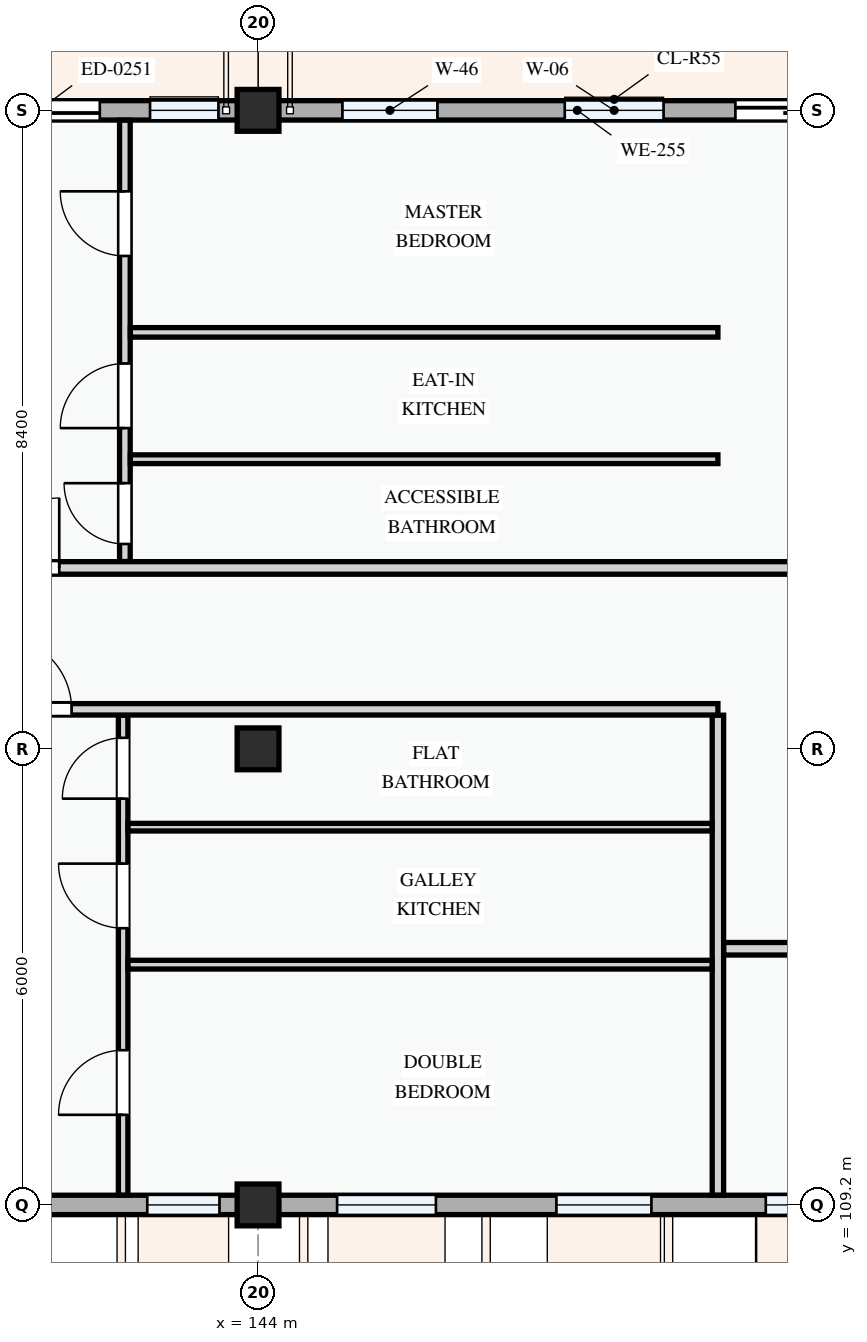
"""IFC4 building model, lengths in metres.
Left out: names, types, materials, properties, quantities, classifications, styles, units other than length and angle.
Written with IfcOpenShell. Run it as: python <this file> out.ifc"""

import sys

from ifc_helpers import new_model, si_unit, direction, frame, frame_2d, origin, origin_2d, place, context, subcontext, project, spatial, rectangle, extrude, element, fill, save


model = new_model("IFC4")
c1 = context("Model", 3, precision=1e-05, world=origin(), true_north=direction((0.0, 1.0)))
c2 = subcontext(c1, "Body", "Model", "MODEL_VIEW")
j1 = project(units=[si_unit("LENGTHUNIT", "METRE"), si_unit("PLANEANGLEUNIT", "RADIAN")], contexts=[c1])
p1 = place(None, origin())
s1 = spatial("IfcSite", under=j1, at=p1, CompositionType="ELEMENT")
p2 = place(p1, origin())
s2 = spatial("IfcBuilding", under=s1, at=p2, CompositionType="ELEMENT")
p3 = place(p2, frame((0.0, 0.0, 34.5)))
s3 = spatial("IfcBuildingStorey", under=s2, at=p3, CompositionType="ELEMENT", Elevation=34.5)
for number, where, z_axis, x_axis in (
    (1, (144.0, 109.2, 0.0), (0.0, 0.0, 1.0), (1.0, 0.0, 0.0)),
    (2, (144.0, 115.2, 0.0), (0.0, 0.0, 1.0), (1.0, 0.0, 0.0)),
    (3, (144.0, 123.6, 0.0), (0.0, 0.0, 1.0), (1.0, 0.0, 0.0)),
):
    element("IfcColumn", number, at=place(p3, frame(where, z_axis=z_axis, x_axis=x_axis)), inside=s3, PredefinedType="COLUMN", context=c2, shape_type="SweptSolid", body=[
        extrude(rectangle(XDim=0.55, YDim=0.55, at=origin_2d()), origin(), (0.0, 0.0, 1.0), 3.3),
    ])
p4 = place(p3, frame((152.4, 123.6, 0.0), z_axis=(0.0, 0.0, 1.0), x_axis=(-1.0, 0.0, 0.0)))
e4 = element("IfcWall", 4, at=p4, inside=s3, PredefinedType="STANDARD", context=c2, shape_type="SweptSolid", body=[
    extrude(rectangle(XDim=8.4, YDim=0.255, at=frame_2d((4.2, 0.0))), origin(), (0.0, 0.0, 1.0), 2.345),
])
p5 = place(p4, frame((0.62, 0.0, 0.0)))
e5 = element("IfcOpeningElement", 5, at=p5, cuts=e4, PredefinedType="OPENING", context=c2, shape_type="SweptSolid", body=[
    extrude(rectangle(XDim=1.5, YDim=2.2, at=frame_2d((0.75, 1.1))), frame((0.0, 0.137, 0.0), z_axis=(0.0, -1.0, 0.0), x_axis=(1.0, 0.0, 0.0)), (0.0, 0.0, 1.0), 0.275),
])
p6 = place(p4, frame((3.065, 0.0, 0.78)))
e6 = element("IfcOpeningElement", 6, at=p6, cuts=e4, PredefinedType="OPENING", context=c2, shape_type="SweptSolid", body=[
    extrude(rectangle(XDim=1.3, YDim=1.4, at=frame_2d((0.65, 0.7))), frame((0.0, 0.137, 0.0), z_axis=(0.0, -1.0, 0.0), x_axis=(1.0, 0.0, 0.0)), (0.0, 0.0, 1.0), 0.275),
])
p7 = place(p4, frame((6.04, 0.0, 0.78)))
e7 = element("IfcOpeningElement", 7, at=p7, cuts=e4, PredefinedType="OPENING", context=c2, shape_type="SweptSolid", body=[
    extrude(rectangle(XDim=1.25, YDim=1.3, at=frame_2d((0.625, 0.65))), frame((0.0, 0.137, 0.0), z_axis=(0.0, -1.0, 0.0), x_axis=(1.0, 0.0, 0.0)), (0.0, 0.0, 1.0), 0.275),
])
p8 = place(p3, frame((144.0, 123.6, 0.0), z_axis=(0.0, 0.0, 1.0), x_axis=(-1.0, 0.0, 0.0)))
e8 = element("IfcWall", 8, at=p8, inside=s3, PredefinedType="STANDARD", context=c2, shape_type="SweptSolid", body=[
    extrude(rectangle(XDim=6.0, YDim=0.255, at=frame_2d((3.0, 0.0))), origin(), (0.0, 0.0, 1.0), 2.445),
])
p9 = place(p8, frame((2.082, 0.0, 0.0)))
e9 = element("IfcOpeningElement", 9, at=p9, cuts=e8, PredefinedType="OPENING", context=c2, shape_type="SweptSolid", body=[
    extrude(rectangle(XDim=1.6, YDim=2.2, at=frame_2d((0.8, 1.1))), frame((0.0, 0.137, 0.0), z_axis=(0.0, -1.0, 0.0), x_axis=(1.0, 0.0, 0.0)), (0.0, 0.0, 1.0), 0.275),
])
p10 = place(p8, frame((0.521, 0.0, 0.78)))
e10 = element("IfcOpeningElement", 10, at=p10, cuts=e8, PredefinedType="OPENING", context=c2, shape_type="SweptSolid", body=[
    extrude(rectangle(XDim=0.9, YDim=1.2, at=frame_2d((0.45, 0.6))), frame((0.0, 0.137, 0.0), z_axis=(0.0, -1.0, 0.0), x_axis=(1.0, 0.0, 0.0)), (0.0, 0.0, 1.0), 0.275),
])
p11 = place(p8, frame((4.031, 0.0, 0.78)))
e11 = element("IfcOpeningElement", 11, at=p11, cuts=e8, PredefinedType="OPENING", context=c2, shape_type="SweptSolid", body=[
    extrude(rectangle(XDim=1.48, YDim=1.52, at=frame_2d((0.74, 0.76))), frame((0.0, 0.137, 0.0), z_axis=(0.0, -1.0, 0.0), x_axis=(1.0, 0.0, 0.0)), (0.0, 0.0, 1.0), 0.275),
])
p12 = place(p3, frame((138.0, 109.2, 0.0), z_axis=(0.0, 0.0, 1.0), x_axis=(1.0, 0.0, 0.0)))
e12 = element("IfcWall", 12, at=p12, inside=s3, PredefinedType="STANDARD", context=c2, shape_type="SweptSolid", body=[
    extrude(rectangle(XDim=6.0, YDim=0.255, at=frame_2d((3.0, 0.0))), origin(), (0.0, 0.0, 1.0), 2.525),
])
p13 = place(p12, frame((1.518, 0.0, 0.78)))
e13 = element("IfcOpeningElement", 13, at=p13, cuts=e12, PredefinedType="OPENING", context=c2, shape_type="SweptSolid", body=[
    extrude(rectangle(XDim=1.38, YDim=1.48, at=frame_2d((0.69, 0.74))), frame((0.0, 0.137, 0.0), z_axis=(0.0, -1.0, 0.0), x_axis=(1.0, 0.0, 0.0)), (0.0, 0.0, 1.0), 0.275),
])
p14 = place(p12, frame((4.542, 0.0, 0.78)))
e14 = element("IfcOpeningElement", 14, at=p14, cuts=e12, PredefinedType="OPENING", context=c2, shape_type="SweptSolid", body=[
    extrude(rectangle(XDim=0.95, YDim=1.15, at=frame_2d((0.475, 0.575))), frame((0.0, 0.137, 0.0), z_axis=(0.0, -1.0, 0.0), x_axis=(1.0, 0.0, 0.0)), (0.0, 0.0, 1.0), 0.275),
])
p15 = place(p3, frame((144.0, 109.2, 0.0), z_axis=(0.0, 0.0, 1.0), x_axis=(1.0, 0.0, 0.0)))
e15 = element("IfcWall", 15, at=p15, inside=s3, PredefinedType="STANDARD", context=c2, shape_type="SweptSolid", body=[
    extrude(rectangle(XDim=8.4, YDim=0.255, at=frame_2d((4.2, 0.0))), origin(), (0.0, 0.0, 1.0), 2.375),
])
p16 = place(p15, frame((1.04, 0.0, 0.78)))
e16 = element("IfcOpeningElement", 16, at=p16, cuts=e15, PredefinedType="OPENING", context=c2, shape_type="SweptSolid", body=[
    extrude(rectangle(XDim=1.3, YDim=1.4, at=frame_2d((0.65, 0.7))), frame((0.0, 0.137, 0.0), z_axis=(0.0, -1.0, 0.0), x_axis=(1.0, 0.0, 0.0)), (0.0, 0.0, 1.0), 0.275),
])
p17 = place(p15, frame((3.925, 0.0, 0.78)))
e17 = element("IfcOpeningElement", 17, at=p17, cuts=e15, PredefinedType="OPENING", context=c2, shape_type="SweptSolid", body=[
    extrude(rectangle(XDim=1.25, YDim=1.3, at=frame_2d((0.625, 0.65))), frame((0.0, 0.137, 0.0), z_axis=(0.0, -1.0, 0.0), x_axis=(1.0, 0.0, 0.0)), (0.0, 0.0, 1.0), 0.275),
])
p18 = place(p15, frame((6.68, 0.0, 0.78)))
e18 = element("IfcOpeningElement", 18, at=p18, cuts=e15, PredefinedType="OPENING", context=c2, shape_type="SweptSolid", body=[
    extrude(rectangle(XDim=0.9, YDim=1.2, at=frame_2d((0.45, 0.6))), frame((0.0, 0.137, 0.0), z_axis=(0.0, -1.0, 0.0), x_axis=(1.0, 0.0, 0.0)), (0.0, 0.0, 1.0), 0.275),
])
p19 = place(p3, frame((150.05, 109.33, 0.0), z_axis=(0.0, 0.0, 1.0), x_axis=(0.0, 1.0, 0.0)))
e19 = element("IfcWall", 19, at=p19, inside=s3, PredefinedType="PARTITIONING", context=c2, shape_type="SweptSolid", body=[
    extrude(rectangle(XDim=6.313, YDim=0.15, at=frame_2d((3.157, 0.0))), origin(), (0.0, 0.0, 1.0), 3.0),
])
p20 = place(p3, frame((150.127, 112.57, 0.0), z_axis=(0.0, 0.0, 1.0), x_axis=(1.0, 0.0, 0.0)))
e20 = element("IfcWall", 20, at=p20, inside=s3, PredefinedType="PARTITIONING", context=c2, shape_type="SweptSolid", body=[
    extrude(rectangle(XDim=2.413, YDim=0.165, at=frame_2d((1.207, 0.0))), origin(), (0.0, 0.0, 1.0), 3.0),
])
p21 = place(p3, frame((142.225, 109.33, 0.0), z_axis=(0.0, 0.0, 1.0), x_axis=(0.0, 1.0, 0.0)))
e21 = element("IfcWall", 21, at=p21, inside=s3, PredefinedType="PARTITIONING", context=c2, shape_type="SweptSolid", body=[
    extrude(rectangle(XDim=6.313, YDim=0.125, at=frame_2d((3.157, 0.0))), origin(), (0.0, 0.0, 1.0), 3.0),
])
p22 = place(p21, frame((1.056, 0.0, 0.0)))
e22 = element("IfcOpeningElement", 22, at=p22, cuts=e21, PredefinedType="OPENING", context=c2, shape_type="SweptSolid", body=[
    extrude(rectangle(XDim=0.85, YDim=2.1, at=frame_2d((0.425, 1.05))), frame((0.0, 0.073, 0.0), z_axis=(0.0, -1.0, 0.0), x_axis=(1.0, 0.0, 0.0)), (0.0, 0.0, 1.0), 0.145),
])
p23 = place(p21, frame((3.511, 0.0, 0.0)))
e23 = element("IfcOpeningElement", 23, at=p23, cuts=e21, PredefinedType="OPENING", context=c2, shape_type="SweptSolid", body=[
    extrude(rectangle(XDim=0.85, YDim=2.1, at=frame_2d((0.425, 1.05))), frame((0.0, 0.073, 0.0), z_axis=(0.0, -1.0, 0.0), x_axis=(1.0, 0.0, 0.0)), (0.0, 0.0, 1.0), 0.145),
])
p24 = place(p21, frame((5.215, 0.0, 0.0)))
e24 = element("IfcOpeningElement", 24, at=p24, cuts=e21, PredefinedType="OPENING", context=c2, shape_type="SweptSolid", body=[
    extrude(rectangle(XDim=0.8, YDim=2.1, at=frame_2d((0.4, 1.05))), frame((0.0, 0.073, 0.0), z_axis=(0.0, -1.0, 0.0), x_axis=(1.0, 0.0, 0.0)), (0.0, 0.0, 1.0), 0.145),
])
p25 = place(p3, frame((142.29, 112.361, 0.0), z_axis=(0.0, 0.0, 1.0), x_axis=(1.0, 0.0, 0.0)))
e25 = element("IfcWall", 25, at=p25, inside=s3, PredefinedType="PARTITIONING", context=c2, shape_type="SweptSolid", body=[
    extrude(rectangle(XDim=7.683, YDim=0.115, at=frame_2d((3.842, 0.0))), origin(), (0.0, 0.0, 1.0), 3.0),
])
p26 = place(p3, frame((142.29, 114.17, 0.0), z_axis=(0.0, 0.0, 1.0), x_axis=(1.0, 0.0, 0.0)))
e26 = element("IfcWall", 26, at=p26, inside=s3, PredefinedType="PARTITIONING", context=c2, shape_type="SweptSolid", body=[
    extrude(rectangle(XDim=7.683, YDim=0.1, at=frame_2d((3.842, 0.0))), origin(), (0.0, 0.0, 1.0), 3.0),
])
p27 = place(p3, frame((142.248, 117.665, 0.0), z_axis=(0.0, 0.0, 1.0), x_axis=(0.0, 1.0, 0.0)))
e27 = element("IfcWall", 27, at=p27, inside=s3, PredefinedType="PARTITIONING", context=c2, shape_type="SweptSolid", body=[
    extrude(rectangle(XDim=5.806, YDim=0.14, at=frame_2d((2.903, 0.0))), origin(), (0.0, 0.0, 1.0), 3.0),
])
p28 = place(p27, frame((0.231, 0.0, 0.0)))
e28 = element("IfcOpeningElement", 28, at=p28, cuts=e27, PredefinedType="OPENING", context=c2, shape_type="SweptSolid", body=[
    extrude(rectangle(XDim=0.8, YDim=2.1, at=frame_2d((0.4, 1.05))), frame((0.0, 0.08, 0.0), z_axis=(0.0, -1.0, 0.0), x_axis=(1.0, 0.0, 0.0)), (0.0, 0.0, 1.0), 0.16),
])
p29 = place(p27, frame((1.755, 0.0, 0.0)))
e29 = element("IfcOpeningElement", 29, at=p29, cuts=e27, PredefinedType="OPENING", context=c2, shape_type="SweptSolid", body=[
    extrude(rectangle(XDim=0.85, YDim=2.1, at=frame_2d((0.425, 1.05))), frame((0.0, 0.08, 0.0), z_axis=(0.0, -1.0, 0.0), x_axis=(1.0, 0.0, 0.0)), (0.0, 0.0, 1.0), 0.16),
])
p30 = place(p27, frame((4.02, 0.0, 0.0)))
e30 = element("IfcOpeningElement", 30, at=p30, cuts=e27, PredefinedType="OPENING", context=c2, shape_type="SweptSolid", body=[
    extrude(rectangle(XDim=0.85, YDim=2.1, at=frame_2d((0.425, 1.05))), frame((0.0, 0.08, 0.0), z_axis=(0.0, -1.0, 0.0), x_axis=(1.0, 0.0, 0.0)), (0.0, 0.0, 1.0), 0.16),
])
p31 = place(p3, frame((142.32, 120.679, 0.0), z_axis=(0.0, 0.0, 1.0), x_axis=(1.0, 0.0, 0.0)))
e31 = element("IfcWall", 31, at=p31, inside=s3, PredefinedType="PARTITIONING", context=c2, shape_type="SweptSolid", body=[
    extrude(rectangle(XDim=7.73, YDim=0.125, at=frame_2d((3.865, 0.0))), origin(), (0.0, 0.0, 1.0), 3.0),
])
p32 = place(p3, frame((142.32, 119.01, 0.0), z_axis=(0.0, 0.0, 1.0), x_axis=(1.0, 0.0, 0.0)))
e32 = element("IfcWall", 32, at=p32, inside=s3, PredefinedType="PARTITIONING", context=c2, shape_type="SweptSolid", body=[
    extrude(rectangle(XDim=7.73, YDim=0.115, at=frame_2d((3.865, 0.0))), origin(), (0.0, 0.0, 1.0), 3.0),
])
p33 = place(p3, frame((109.33, 115.72, 0.0), z_axis=(0.0, 0.0, 1.0), x_axis=(1.0, 0.0, 0.0)))
e33 = element("IfcWall", 33, at=p33, inside=s3, PredefinedType="PARTITIONING", context=c2, shape_type="SweptSolid", body=[
    extrude(rectangle(XDim=40.72, YDim=0.15, at=frame_2d((20.36, 0.0))), origin(), (0.0, 0.0, 1.0), 3.0),
])
p34 = place(p33, frame((2.32, 0.0, 0.0)))
e34 = element("IfcOpeningElement", 34, at=p34, cuts=e33, PredefinedType="OPENING", context=c2, shape_type="SweptSolid", body=[
    extrude(rectangle(XDim=0.92, YDim=2.1, at=frame_2d((0.46, 1.05))), frame((0.0, 0.085, 0.0), z_axis=(0.0, -1.0, 0.0), x_axis=(1.0, 0.0, 0.0)), (0.0, 0.0, 1.0), 0.17),
])
p35 = place(p33, frame((16.851, 0.0, 0.0)))
e35 = element("IfcOpeningElement", 35, at=p35, cuts=e33, PredefinedType="OPENING", context=c2, shape_type="SweptSolid", body=[
    extrude(rectangle(XDim=0.92, YDim=2.1, at=frame_2d((0.46, 1.05))), frame((0.0, 0.085, 0.0), z_axis=(0.0, -1.0, 0.0), x_axis=(1.0, 0.0, 0.0)), (0.0, 0.0, 1.0), 0.17),
])
p36 = place(p33, frame((31.258, 0.0, 0.0)))
e36 = element("IfcOpeningElement", 36, at=p36, cuts=e33, PredefinedType="OPENING", context=c2, shape_type="SweptSolid", body=[
    extrude(rectangle(XDim=0.96, YDim=2.12, at=frame_2d((0.48, 1.06))), frame((0.0, 0.085, 0.0), z_axis=(0.0, -1.0, 0.0), x_axis=(1.0, 0.0, 0.0)), (0.0, 0.0, 1.0), 0.17),
])
p37 = place(p3, frame((109.33, 117.58, 0.0), z_axis=(0.0, 0.0, 1.0), x_axis=(1.0, 0.0, 0.0)))
e37 = element("IfcWall", 37, at=p37, inside=s3, PredefinedType="PARTITIONING", context=c2, shape_type="SweptSolid", body=[
    extrude(rectangle(XDim=43.21, YDim=0.165, at=frame_2d((21.605, 0.0))), origin(), (0.0, 0.0, 1.0), 3.0),
])
p38 = place(p37, frame((2.337, 0.0, 0.0)))
e38 = element("IfcOpeningElement", 38, at=p38, cuts=e37, PredefinedType="OPENING", context=c2, shape_type="SweptSolid", body=[
    extrude(rectangle(XDim=0.92, YDim=2.1, at=frame_2d((0.46, 1.05))), frame((0.0, 0.093, 0.0), z_axis=(0.0, -1.0, 0.0), x_axis=(1.0, 0.0, 0.0)), (0.0, 0.0, 1.0), 0.185),
])
p39 = place(p37, frame((16.721, 0.0, 0.0)))
e39 = element("IfcOpeningElement", 39, at=p39, cuts=e37, PredefinedType="OPENING", context=c2, shape_type="SweptSolid", body=[
    extrude(rectangle(XDim=0.92, YDim=2.1, at=frame_2d((0.46, 1.05))), frame((0.0, 0.093, 0.0), z_axis=(0.0, -1.0, 0.0), x_axis=(1.0, 0.0, 0.0)), (0.0, 0.0, 1.0), 0.185),
])
p40 = place(p37, frame((31.135, 0.0, 0.0)))
e40 = element("IfcOpeningElement", 40, at=p40, cuts=e37, PredefinedType="OPENING", context=c2, shape_type="SweptSolid", body=[
    extrude(rectangle(XDim=0.92, YDim=2.1, at=frame_2d((0.46, 1.05))), frame((0.0, 0.093, 0.0), z_axis=(0.0, -1.0, 0.0), x_axis=(1.0, 0.0, 0.0)), (0.0, 0.0, 1.0), 0.185),
])
p41 = place(p5, frame((1.5, 0.0, 0.0), z_axis=(0.0, 0.0, 1.0), x_axis=(-1.0, 0.0, 0.0)))
e41 = element("IfcDoor", 41, at=p41, inside=s3, OperationType="SLIDING_TO_RIGHT", PredefinedType="DOOR", context=c2, shape_type="SweptSolid", body=[
    extrude(rectangle(XDim=1.5, YDim=2.2, at=frame_2d((0.75, 1.1))), frame((0.0, 0.025, 0.0), z_axis=(0.0, -1.0, 0.0), x_axis=(1.0, 0.0, 0.0)), (0.0, 0.0, 1.0), 0.05),
])
fill(e5, e41)
p42 = place(p6, origin())
e42 = element("IfcWindow", 42, at=p42, inside=s3, PartitioningType="SINGLE_PANEL", PredefinedType="WINDOW", context=c2, shape_type="SweptSolid", body=[
    extrude(rectangle(XDim=1.3, YDim=1.4, at=frame_2d((0.65, 0.7))), frame((0.0, 0.03, 0.0), z_axis=(0.0, -1.0, 0.0), x_axis=(1.0, 0.0, 0.0)), (0.0, 0.0, 1.0), 0.06),
])
fill(e6, e42)
p43 = place(p7, origin())
e43 = element("IfcWindow", 43, at=p43, inside=s3, PartitioningType="SINGLE_PANEL", PredefinedType="WINDOW", context=c2, shape_type="SweptSolid", body=[
    extrude(rectangle(XDim=1.25, YDim=1.3, at=frame_2d((0.625, 0.65))), frame((0.0, 0.03, 0.0), z_axis=(0.0, -1.0, 0.0), x_axis=(1.0, 0.0, 0.0)), (0.0, 0.0, 1.0), 0.06),
])
fill(e7, e43)
p44 = place(p9, frame((1.6, 0.0, 0.0), z_axis=(0.0, 0.0, 1.0), x_axis=(-1.0, 0.0, 0.0)))
e44 = element("IfcDoor", 44, at=p44, inside=s3, OperationType="SLIDING_TO_LEFT", PredefinedType="DOOR", context=c2, shape_type="SweptSolid", body=[
    extrude(rectangle(XDim=1.6, YDim=2.2, at=frame_2d((0.8, 1.1))), frame((0.0, 0.025, 0.0), z_axis=(0.0, -1.0, 0.0), x_axis=(1.0, 0.0, 0.0)), (0.0, 0.0, 1.0), 0.05),
])
fill(e9, e44)
p45 = place(p10, origin())
e45 = element("IfcWindow", 45, at=p45, inside=s3, PartitioningType="SINGLE_PANEL", PredefinedType="WINDOW", context=c2, shape_type="SweptSolid", body=[
    extrude(rectangle(XDim=0.9, YDim=1.2, at=frame_2d((0.45, 0.6))), frame((0.0, 0.03, 0.0), z_axis=(0.0, -1.0, 0.0), x_axis=(1.0, 0.0, 0.0)), (0.0, 0.0, 1.0), 0.06),
])
fill(e10, e45)
p46 = place(p14, origin())
e46 = element("IfcWindow", 46, at=p46, inside=s3, PartitioningType="SINGLE_PANEL", PredefinedType="WINDOW", context=c2, shape_type="SweptSolid", body=[
    extrude(rectangle(XDim=0.95, YDim=1.15, at=frame_2d((0.475, 0.575))), frame((0.0, 0.03, 0.0), z_axis=(0.0, -1.0, 0.0), x_axis=(1.0, 0.0, 0.0)), (0.0, 0.0, 1.0), 0.06),
])
fill(e14, e46)
p47 = place(p16, origin())
e47 = element("IfcWindow", 47, at=p47, inside=s3, PartitioningType="SINGLE_PANEL", PredefinedType="WINDOW", context=c2, shape_type="SweptSolid", body=[
    extrude(rectangle(XDim=1.3, YDim=1.4, at=frame_2d((0.65, 0.7))), frame((0.0, 0.03, 0.0), z_axis=(0.0, -1.0, 0.0), x_axis=(1.0, 0.0, 0.0)), (0.0, 0.0, 1.0), 0.06),
])
fill(e16, e47)
p48 = place(p17, origin())
e48 = element("IfcWindow", 48, at=p48, inside=s3, PartitioningType="SINGLE_PANEL", PredefinedType="WINDOW", context=c2, shape_type="SweptSolid", body=[
    extrude(rectangle(XDim=1.25, YDim=1.3, at=frame_2d((0.625, 0.65))), frame((0.0, 0.03, 0.0), z_axis=(0.0, -1.0, 0.0), x_axis=(1.0, 0.0, 0.0)), (0.0, 0.0, 1.0), 0.06),
])
fill(e17, e48)
p49 = place(p18, origin())
e49 = element("IfcWindow", 49, at=p49, inside=s3, PartitioningType="SINGLE_PANEL", PredefinedType="WINDOW", context=c2, shape_type="SweptSolid", body=[
    extrude(rectangle(XDim=0.9, YDim=1.2, at=frame_2d((0.45, 0.6))), frame((0.0, 0.03, 0.0), z_axis=(0.0, -1.0, 0.0), x_axis=(1.0, 0.0, 0.0)), (0.0, 0.0, 1.0), 0.06),
])
fill(e18, e49)
p50 = place(p22, origin())
e50 = element("IfcDoor", 50, at=p50, inside=s3, OperationType="SINGLE_SWING_LEFT", PredefinedType="DOOR", context=c2, shape_type="SweptSolid", body=[
    extrude(rectangle(XDim=0.85, YDim=2.1, at=frame_2d((0.425, 1.05))), frame((0.0, 0.025, 0.0), z_axis=(0.0, -1.0, 0.0), x_axis=(1.0, 0.0, 0.0)), (0.0, 0.0, 1.0), 0.05),
])
fill(e22, e50)
p51 = place(p23, origin())
e51 = element("IfcDoor", 51, at=p51, inside=s3, OperationType="SINGLE_SWING_RIGHT", PredefinedType="DOOR", context=c2, shape_type="SweptSolid", body=[
    extrude(rectangle(XDim=0.85, YDim=2.1, at=frame_2d((0.425, 1.05))), frame((0.0, 0.025, 0.0), z_axis=(0.0, -1.0, 0.0), x_axis=(1.0, 0.0, 0.0)), (0.0, 0.0, 1.0), 0.05),
])
fill(e23, e51)
p52 = place(p24, origin())
e52 = element("IfcDoor", 52, at=p52, inside=s3, OperationType="SINGLE_SWING_LEFT", PredefinedType="DOOR", context=c2, shape_type="SweptSolid", body=[
    extrude(rectangle(XDim=0.8, YDim=2.1, at=frame_2d((0.4, 1.05))), frame((0.0, 0.025, 0.0), z_axis=(0.0, -1.0, 0.0), x_axis=(1.0, 0.0, 0.0)), (0.0, 0.0, 1.0), 0.05),
])
fill(e24, e52)
p53 = place(p28, origin())
e53 = element("IfcDoor", 53, at=p53, inside=s3, OperationType="SINGLE_SWING_RIGHT", PredefinedType="DOOR", context=c2, shape_type="SweptSolid", body=[
    extrude(rectangle(XDim=0.8, YDim=2.1, at=frame_2d((0.4, 1.05))), frame((0.0, 0.025, 0.0), z_axis=(0.0, -1.0, 0.0), x_axis=(1.0, 0.0, 0.0)), (0.0, 0.0, 1.0), 0.05),
])
fill(e28, e53)
p54 = place(p29, origin())
e54 = element("IfcDoor", 54, at=p54, inside=s3, OperationType="SINGLE_SWING_LEFT", PredefinedType="DOOR", context=c2, shape_type="SweptSolid", body=[
    extrude(rectangle(XDim=0.85, YDim=2.1, at=frame_2d((0.425, 1.05))), frame((0.0, 0.025, 0.0), z_axis=(0.0, -1.0, 0.0), x_axis=(1.0, 0.0, 0.0)), (0.0, 0.0, 1.0), 0.05),
])
fill(e29, e54)
p55 = place(p30, origin())
e55 = element("IfcDoor", 55, at=p55, inside=s3, OperationType="SINGLE_SWING_RIGHT", PredefinedType="DOOR", context=c2, shape_type="SweptSolid", body=[
    extrude(rectangle(XDim=0.85, YDim=2.1, at=frame_2d((0.425, 1.05))), frame((0.0, 0.025, 0.0), z_axis=(0.0, -1.0, 0.0), x_axis=(1.0, 0.0, 0.0)), (0.0, 0.0, 1.0), 0.05),
])
fill(e30, e55)
p56 = place(p36, origin())
e56 = element("IfcDoor", 56, at=p56, inside=s3, OperationType="SINGLE_SWING_LEFT", PredefinedType="DOOR", context=c2, shape_type="SweptSolid", body=[
    extrude(rectangle(XDim=0.96, YDim=2.12, at=frame_2d((0.48, 1.06))), frame((0.0, 0.025, 0.0), z_axis=(0.0, -1.0, 0.0), x_axis=(1.0, 0.0, 0.0)), (0.0, 0.0, 1.0), 0.05),
])
fill(e36, e56)
p57 = place(p40, origin())
e57 = element("IfcDoor", 57, at=p57, inside=s3, OperationType="SINGLE_SWING_RIGHT", PredefinedType="DOOR", context=c2, shape_type="SweptSolid", body=[
    extrude(rectangle(XDim=0.92, YDim=2.1, at=frame_2d((0.46, 1.05))), frame((0.0, 0.025, 0.0), z_axis=(0.0, -1.0, 0.0), x_axis=(1.0, 0.0, 0.0)), (0.0, 0.0, 1.0), 0.05),
])
fill(e40, e57)
save(model, sys.argv[1])
